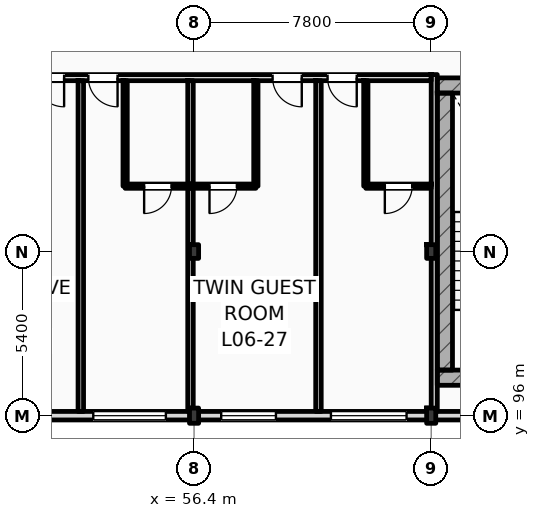
"""IFC4 building model, lengths in metres.
Left out: names, types, materials, properties, quantities, classifications, styles, units other than length and angle.
Written with IfcOpenShell. Run it as: python <this file> out.ifc"""

import sys

from ifc_helpers import new_model, si_unit, direction, frame, frame_2d, origin, origin_2d, place, context, subcontext, project, spatial, rectangle, i_section, extrude, element, fill, save


model = new_model("IFC4")
c1 = context("Model", 3, precision=1e-05, world=origin(), true_north=direction((0.0, 1.0)))
c2 = subcontext(c1, "Body", "Model", "MODEL_VIEW")
j1 = project(units=[si_unit("LENGTHUNIT", "METRE"), si_unit("PLANEANGLEUNIT", "RADIAN")], contexts=[c1])
p1 = place(None, origin())
s1 = spatial("IfcSite", under=j1, at=p1, CompositionType="ELEMENT")
p2 = place(p1, origin())
s2 = spatial("IfcBuilding", under=s1, at=p2, CompositionType="ELEMENT")
p3 = place(p2, frame((0.0, 0.0, 28.2)))
s3 = spatial("IfcBuildingStorey", under=s2, at=p3, CompositionType="ELEMENT", Elevation=28.2)
p4 = place(p3, frame((56.4, 96.0, 0.0), z_axis=(0.0, 0.0, 1.0), x_axis=(1.0, 0.0, 0.0)))
e1 = element("IfcColumn", 1, at=p4, inside=s3, PredefinedType="COLUMN", context=c2, shape_type="SweptSolid", body=[
    extrude(i_section(OverallWidth=0.3, OverallDepth=0.5, WebThickness=0.014, FlangeThickness=0.028, FilletRadius=0.027, at=origin_2d()), origin(), (0.0, 0.0, 1.0), 3.6),
])
p5 = place(p3, frame((56.4, 101.4, 0.0), z_axis=(0.0, 0.0, 1.0), x_axis=(1.0, 0.0, 0.0)))
e2 = element("IfcColumn", 2, at=p5, inside=s3, PredefinedType="COLUMN", context=c2, shape_type="SweptSolid", body=[
    extrude(i_section(OverallWidth=0.3, OverallDepth=0.45, WebThickness=0.014, FlangeThickness=0.026, FilletRadius=0.027, at=origin_2d()), origin(), (0.0, 0.0, 1.0), 3.6),
])
p6 = place(p3, frame((64.2, 96.0, 0.0), z_axis=(0.0, 0.0, 1.0), x_axis=(1.0, 0.0, 0.0)))
e3 = element("IfcColumn", 3, at=p6, inside=s3, PredefinedType="COLUMN", context=c2, shape_type="SweptSolid", body=[
    extrude(i_section(OverallWidth=0.3, OverallDepth=0.5, WebThickness=0.014, FlangeThickness=0.028, FilletRadius=0.027, at=origin_2d()), origin(), (0.0, 0.0, 1.0), 3.6),
])
p7 = place(p3, frame((64.2, 101.4, 0.0), z_axis=(0.0, 0.0, 1.0), x_axis=(1.0, 0.0, 0.0)))
e4 = element("IfcColumn", 4, at=p7, inside=s3, PredefinedType="COLUMN", context=c2, shape_type="SweptSolid", body=[
    extrude(i_section(OverallWidth=0.3, OverallDepth=0.45, WebThickness=0.014, FlangeThickness=0.026, FilletRadius=0.027, at=origin_2d()), origin(), (0.0, 0.0, 1.0), 3.6),
])
for number, where, z_axis, x_axis in (
    (5, (64.4, 106.862, 0.0), (0.0, 0.0, 1.0), (1.0, 0.0, 0.0)),
    (6, (64.4, 97.25, 0.0), (0.0, 0.0, 1.0), (1.0, 0.0, 0.0)),
):
    element("IfcWall", number, at=place(p3, frame(where, z_axis=z_axis, x_axis=x_axis)), inside=s3, PredefinedType="SHEAR", context=c2, shape_type="SweptSolid", body=[
        extrude(rectangle(XDim=5.16, YDim=0.5, at=frame_2d((2.58, 0.0))), origin(), (0.0, 0.0, 1.0), 3.6),
    ])
p8 = place(p3, frame((64.65, 97.5, 0.0), z_axis=(0.0, 0.0, 1.0), x_axis=(0.0, 1.0, 0.0)))
e7 = element("IfcWall", 7, at=p8, inside=s3, PredefinedType="SHEAR", context=c2, shape_type="SweptSolid", body=[
    extrude(rectangle(XDim=9.112, YDim=0.5, at=frame_2d((4.556, 0.0))), origin(), (0.0, 0.0, 1.0), 3.6),
])
p9 = place(p3, frame((25.2, 96.0, 0.0), z_axis=(0.0, 0.0, 1.0), x_axis=(1.0, 0.0, 0.0)))
e8 = element("IfcWall", 8, at=p9, inside=s3, PredefinedType="STANDARD", context=c2, shape_type="SweptSolid", body=[
    extrude(rectangle(XDim=94.8, YDim=0.28, at=frame_2d((47.4, 0.0))), origin(), (0.0, 0.0, 1.0), 2.8),
])
p10 = place(p9, frame((16.454, 0.0, 0.9)))
e9 = element("IfcOpeningElement", 9, at=p10, cuts=e8, PredefinedType="OPENING", context=c2, shape_type="SweptSolid", body=[
    extrude(rectangle(XDim=2.7, YDim=1.72, at=frame_2d((1.35, 0.86))), frame((0.0, 0.15, 0.0), z_axis=(0.0, -1.0, 0.0), x_axis=(1.0, 0.0, 0.0)), (0.0, 0.0, 1.0), 0.3),
])
p11 = place(p9, frame((20.068, 0.0, 0.9)))
e10 = element("IfcOpeningElement", 10, at=p11, cuts=e8, PredefinedType="OPENING", context=c2, shape_type="SweptSolid", body=[
    extrude(rectangle(XDim=2.389, YDim=1.72, at=frame_2d((1.194, 0.86))), frame((0.0, 0.15, 0.0), z_axis=(0.0, -1.0, 0.0), x_axis=(1.0, 0.0, 0.0)), (0.0, 0.0, 1.0), 0.3),
])
p12 = place(p9, frame((24.277, 0.0, 0.9)))
e11 = element("IfcOpeningElement", 11, at=p12, cuts=e8, PredefinedType="OPENING", context=c2, shape_type="SweptSolid", body=[
    extrude(rectangle(XDim=1.8, YDim=1.72, at=frame_2d((0.9, 0.86))), frame((0.0, 0.15, 0.0), z_axis=(0.0, -1.0, 0.0), x_axis=(1.0, 0.0, 0.0)), (0.0, 0.0, 1.0), 0.3),
])
p13 = place(p9, frame((27.885, 0.0, 0.9)))
e12 = element("IfcOpeningElement", 12, at=p13, cuts=e8, PredefinedType="OPENING", context=c2, shape_type="SweptSolid", body=[
    extrude(rectangle(XDim=2.388, YDim=1.72, at=frame_2d((1.194, 0.86))), frame((0.0, 0.15, 0.0), z_axis=(0.0, -1.0, 0.0), x_axis=(1.0, 0.0, 0.0)), (0.0, 0.0, 1.0), 0.3),
])
p14 = place(p9, frame((32.093, 0.0, 0.9)))
e13 = element("IfcOpeningElement", 13, at=p14, cuts=e8, PredefinedType="OPENING", context=c2, shape_type="SweptSolid", body=[
    extrude(rectangle(XDim=1.8, YDim=1.72, at=frame_2d((0.9, 0.86))), frame((0.0, 0.15, 0.0), z_axis=(0.0, -1.0, 0.0), x_axis=(1.0, 0.0, 0.0)), (0.0, 0.0, 1.0), 0.3),
])
p15 = place(p9, frame((35.702, 0.0, 0.9)))
e14 = element("IfcOpeningElement", 14, at=p15, cuts=e8, PredefinedType="OPENING", context=c2, shape_type="SweptSolid", body=[
    extrude(rectangle(XDim=2.488, YDim=1.72, at=frame_2d((1.244, 0.86))), frame((0.0, 0.15, 0.0), z_axis=(0.0, -1.0, 0.0), x_axis=(1.0, 0.0, 0.0)), (0.0, 0.0, 1.0), 0.3),
])
p16 = place(p9, frame((55.56, 0.0, 0.9)))
e15 = element("IfcOpeningElement", 15, at=p16, cuts=e8, PredefinedType="OPENING", context=c2, shape_type="SweptSolid", body=[
    extrude(rectangle(XDim=1.8, YDim=1.72, at=frame_2d((0.9, 0.86))), frame((0.0, 0.15, 0.0), z_axis=(0.0, -1.0, 0.0), x_axis=(1.0, 0.0, 0.0)), (0.0, 0.0, 1.0), 0.3),
])
p17 = place(p9, frame((58.985, 0.0, 0.9)))
e16 = element("IfcOpeningElement", 16, at=p17, cuts=e8, PredefinedType="OPENING", context=c2, shape_type="SweptSolid", body=[
    extrude(rectangle(XDim=1.8, YDim=1.72, at=frame_2d((0.9, 0.86))), frame((0.0, 0.15, 0.0), z_axis=(0.0, -1.0, 0.0), x_axis=(1.0, 0.0, 0.0)), (0.0, 0.0, 1.0), 0.3),
])
p18 = place(p9, frame((63.21, 0.0, 0.9)))
e17 = element("IfcOpeningElement", 17, at=p18, cuts=e8, PredefinedType="OPENING", context=c2, shape_type="SweptSolid", body=[
    extrude(rectangle(XDim=2.525, YDim=1.72, at=frame_2d((1.262, 0.86))), frame((0.0, 0.15, 0.0), z_axis=(0.0, -1.0, 0.0), x_axis=(1.0, 0.0, 0.0)), (0.0, 0.0, 1.0), 0.3),
])
p19 = place(p9, frame((66.955, 0.0, 0.9)))
e18 = element("IfcOpeningElement", 18, at=p19, cuts=e8, PredefinedType="OPENING", context=c2, shape_type="SweptSolid", body=[
    extrude(rectangle(XDim=1.8, YDim=1.72, at=frame_2d((0.9, 0.86))), frame((0.0, 0.15, 0.0), z_axis=(0.0, -1.0, 0.0), x_axis=(1.0, 0.0, 0.0)), (0.0, 0.0, 1.0), 0.3),
])
p20 = place(p9, frame((71.892, 0.0, 0.9)))
e19 = element("IfcOpeningElement", 19, at=p20, cuts=e8, PredefinedType="OPENING", context=c2, shape_type="SweptSolid", body=[
    extrude(rectangle(XDim=1.1, YDim=1.5, at=frame_2d((0.55, 0.75))), frame((0.0, 0.15, 0.0), z_axis=(0.0, -1.0, 0.0), x_axis=(1.0, 0.0, 0.0)), (0.0, 0.0, 1.0), 0.3),
])
p21 = place(p9, frame((75.802, 0.0, 0.9)))
e20 = element("IfcOpeningElement", 20, at=p21, cuts=e8, PredefinedType="OPENING", context=c2, shape_type="SweptSolid", body=[
    extrude(rectangle(XDim=1.25, YDim=1.6, at=frame_2d((0.625, 0.8))), frame((0.0, 0.15, 0.0), z_axis=(0.0, -1.0, 0.0), x_axis=(1.0, 0.0, 0.0)), (0.0, 0.0, 1.0), 0.3),
])
p22 = place(p9, frame((79.712, 0.0, 0.9)))
e21 = element("IfcOpeningElement", 21, at=p22, cuts=e8, PredefinedType="OPENING", context=c2, shape_type="SweptSolid", body=[
    extrude(rectangle(XDim=1.4, YDim=1.7, at=frame_2d((0.7, 0.85))), frame((0.0, 0.15, 0.0), z_axis=(0.0, -1.0, 0.0), x_axis=(1.0, 0.0, 0.0)), (0.0, 0.0, 1.0), 0.3),
])
p23 = place(p9, frame((83.597, 0.0, 0.9)))
e22 = element("IfcOpeningElement", 22, at=p23, cuts=e8, PredefinedType="OPENING", context=c2, shape_type="SweptSolid", body=[
    extrude(rectangle(XDim=1.6, YDim=1.72, at=frame_2d((0.8, 0.86))), frame((0.0, 0.15, 0.0), z_axis=(0.0, -1.0, 0.0), x_axis=(1.0, 0.0, 0.0)), (0.0, 0.0, 1.0), 0.3),
])
p24 = place(p9, frame((87.507, 0.0, 0.9)))
e23 = element("IfcOpeningElement", 23, at=p24, cuts=e8, PredefinedType="OPENING", context=c2, shape_type="SweptSolid", body=[
    extrude(rectangle(XDim=1.75, YDim=1.72, at=frame_2d((0.875, 0.86))), frame((0.0, 0.15, 0.0), z_axis=(0.0, -1.0, 0.0), x_axis=(1.0, 0.0, 0.0)), (0.0, 0.0, 1.0), 0.3),
])
p25 = place(p9, frame((91.328, 0.0, 0.9)))
e24 = element("IfcOpeningElement", 24, at=p25, cuts=e8, PredefinedType="OPENING", context=c2, shape_type="SweptSolid", body=[
    extrude(rectangle(XDim=2.0, YDim=1.72, at=frame_2d((1.0, 0.86))), frame((0.0, 0.15, 0.0), z_axis=(0.0, -1.0, 0.0), x_axis=(1.0, 0.0, 0.0)), (0.0, 0.0, 1.0), 0.3),
])
p26 = place(p3, frame((40.76, 107.12, 0.0), z_axis=(0.0, 0.0, 1.0), x_axis=(1.0, 0.0, 0.0)))
e25 = element("IfcWall", 25, at=p26, inside=s3, PredefinedType="PARTITIONING", context=c2, shape_type="SweptSolid", body=[
    extrude(rectangle(XDim=23.44, YDim=0.2, at=frame_2d((11.72, 0.0))), origin(), (0.0, 0.0, 1.0), 3.36),
])
p27 = place(p26, frame((2.639, 0.0, 0.0)))
e26 = element("IfcOpeningElement", 26, at=p27, cuts=e25, PredefinedType="OPENING", context=c2, shape_type="SweptSolid", body=[
    extrude(rectangle(XDim=0.96, YDim=2.2, at=frame_2d((0.48, 1.1))), frame((0.0, 0.11, 0.0), z_axis=(0.0, -1.0, 0.0), x_axis=(1.0, 0.0, 0.0)), (0.0, 0.0, 1.0), 0.22),
])
p28 = place(p26, frame((4.348, 0.0, 0.0)))
e27 = element("IfcOpeningElement", 27, at=p28, cuts=e25, PredefinedType="OPENING", context=c2, shape_type="SweptSolid", body=[
    extrude(rectangle(XDim=0.96, YDim=2.2, at=frame_2d((0.48, 1.1))), frame((0.0, 0.11, 0.0), z_axis=(0.0, -1.0, 0.0), x_axis=(1.0, 0.0, 0.0)), (0.0, 0.0, 1.0), 0.22),
])
p29 = place(p26, frame((10.406, 0.0, 0.0)))
e28 = element("IfcOpeningElement", 28, at=p29, cuts=e25, PredefinedType="OPENING", context=c2, shape_type="SweptSolid", body=[
    extrude(rectangle(XDim=0.96, YDim=2.2, at=frame_2d((0.48, 1.1))), frame((0.0, 0.11, 0.0), z_axis=(0.0, -1.0, 0.0), x_axis=(1.0, 0.0, 0.0)), (0.0, 0.0, 1.0), 0.22),
])
p30 = place(p26, frame((12.164, 0.0, 0.0)))
e29 = element("IfcOpeningElement", 29, at=p30, cuts=e25, PredefinedType="OPENING", context=c2, shape_type="SweptSolid", body=[
    extrude(rectangle(XDim=0.96, YDim=2.2, at=frame_2d((0.48, 1.1))), frame((0.0, 0.11, 0.0), z_axis=(0.0, -1.0, 0.0), x_axis=(1.0, 0.0, 0.0)), (0.0, 0.0, 1.0), 0.22),
])
p31 = place(p26, frame((18.223, 0.0, 0.0)))
e30 = element("IfcOpeningElement", 30, at=p31, cuts=e25, PredefinedType="OPENING", context=c2, shape_type="SweptSolid", body=[
    extrude(rectangle(XDim=0.96, YDim=2.2, at=frame_2d((0.48, 1.1))), frame((0.0, 0.11, 0.0), z_axis=(0.0, -1.0, 0.0), x_axis=(1.0, 0.0, 0.0)), (0.0, 0.0, 1.0), 0.22),
])
p32 = place(p26, frame((20.031, 0.0, 0.0)))
e31 = element("IfcOpeningElement", 31, at=p32, cuts=e25, PredefinedType="OPENING", context=c2, shape_type="SweptSolid", body=[
    extrude(rectangle(XDim=0.96, YDim=2.2, at=frame_2d((0.48, 1.1))), frame((0.0, 0.11, 0.0), z_axis=(0.0, -1.0, 0.0), x_axis=(1.0, 0.0, 0.0)), (0.0, 0.0, 1.0), 0.22),
])
p33 = place(p3, frame((64.3, 96.14, 0.0), z_axis=(0.0, 0.0, 1.0), x_axis=(0.0, 1.0, 0.0)))
e32 = element("IfcWall", 32, at=p33, inside=s3, PredefinedType="PARTITIONING", context=c2, shape_type="SweptSolid", body=[
    extrude(rectangle(XDim=11.08, YDim=0.2, at=frame_2d((5.54, 0.0))), origin(), (0.0, 0.0, 1.0), 2.99),
])
p34 = place(p3, frame((52.675, 96.14, 0.0), z_axis=(0.0, 0.0, 1.0), x_axis=(0.0, 1.0, 0.0)))
e33 = element("IfcWall", 33, at=p34, inside=s3, PredefinedType="PARTITIONING", context=c2, shape_type="SweptSolid", body=[
    extrude(rectangle(XDim=10.88, YDim=0.18, at=frame_2d((5.44, 0.0))), origin(), (0.0, 0.0, 1.0), 3.36),
])
p35 = place(p3, frame((56.283, 96.14, 0.0), z_axis=(0.0, 0.0, 1.0), x_axis=(0.0, 1.0, 0.0)))
e34 = element("IfcWall", 34, at=p35, inside=s3, PredefinedType="PARTITIONING", context=c2, shape_type="SweptSolid", body=[
    extrude(rectangle(XDim=10.88, YDim=0.18, at=frame_2d((5.44, 0.0))), origin(), (0.0, 0.0, 1.0), 2.99),
])
p36 = place(p3, frame((54.133, 103.55, 0.0), z_axis=(0.0, 0.0, 1.0), x_axis=(0.0, 1.0, 0.0)))
e35 = element("IfcWall", 35, at=p36, inside=s3, PredefinedType="PARTITIONING", context=c2, shape_type="SweptSolid", body=[
    extrude(rectangle(XDim=3.47, YDim=0.14, at=frame_2d((1.735, 0.0))), origin(), (0.0, 0.0, 1.0), 3.36),
])
p37 = place(p3, frame((54.133, 103.55, 0.0), z_axis=(0.0, 0.0, 1.0), x_axis=(1.0, 0.0, 0.0)))
e36 = element("IfcWall", 36, at=p37, inside=s3, PredefinedType="PARTITIONING", context=c2, shape_type="SweptSolid", body=[
    extrude(rectangle(XDim=2.15, YDim=0.14, at=frame_2d((1.075, 0.0))), origin(), (0.0, 0.0, 1.0), 3.36),
])
p38 = place(p37, frame((0.625, 0.0, 0.0)))
e37 = element("IfcOpeningElement", 37, at=p38, cuts=e36, PredefinedType="OPENING", context=c2, shape_type="SweptSolid", body=[
    extrude(rectangle(XDim=0.9, YDim=2.1, at=frame_2d((0.45, 1.05))), frame((0.0, 0.08, 0.0), z_axis=(0.0, -1.0, 0.0), x_axis=(1.0, 0.0, 0.0)), (0.0, 0.0, 1.0), 0.16),
])
p39 = place(p3, frame((60.492, 96.14, 0.0), z_axis=(0.0, 0.0, 1.0), x_axis=(0.0, 1.0, 0.0)))
e38 = element("IfcWall", 38, at=p39, inside=s3, PredefinedType="PARTITIONING", context=c2, shape_type="SweptSolid", body=[
    extrude(rectangle(XDim=10.88, YDim=0.18, at=frame_2d((5.44, 0.0))), origin(), (0.0, 0.0, 1.0), 3.36),
])
p40 = place(p3, frame((58.433, 103.55, 0.0), z_axis=(0.0, 0.0, 1.0), x_axis=(0.0, 1.0, 0.0)))
e39 = element("IfcWall", 39, at=p40, inside=s3, PredefinedType="PARTITIONING", context=c2, shape_type="SweptSolid", body=[
    extrude(rectangle(XDim=3.47, YDim=0.14, at=frame_2d((1.735, 0.0))), origin(), (0.0, 0.0, 1.0), 3.36),
])
p41 = place(p3, frame((56.283, 103.55, 0.0), z_axis=(0.0, 0.0, 1.0), x_axis=(1.0, 0.0, 0.0)))
e40 = element("IfcWall", 40, at=p41, inside=s3, PredefinedType="PARTITIONING", context=c2, shape_type="SweptSolid", body=[
    extrude(rectangle(XDim=2.15, YDim=0.14, at=frame_2d((1.075, 0.0))), origin(), (0.0, 0.0, 1.0), 3.36),
])
p42 = place(p41, frame((0.625, 0.0, 0.0)))
e41 = element("IfcOpeningElement", 41, at=p42, cuts=e40, PredefinedType="OPENING", context=c2, shape_type="SweptSolid", body=[
    extrude(rectangle(XDim=0.9, YDim=2.1, at=frame_2d((0.45, 1.05))), frame((0.0, 0.08, 0.0), z_axis=(0.0, -1.0, 0.0), x_axis=(1.0, 0.0, 0.0)), (0.0, 0.0, 1.0), 0.16),
])
p43 = place(p3, frame((62.05, 103.55, 0.0), z_axis=(0.0, 0.0, 1.0), x_axis=(0.0, 1.0, 0.0)))
e42 = element("IfcWall", 42, at=p43, inside=s3, PredefinedType="PARTITIONING", context=c2, shape_type="SweptSolid", body=[
    extrude(rectangle(XDim=3.47, YDim=0.14, at=frame_2d((1.735, 0.0))), origin(), (0.0, 0.0, 1.0), 3.36),
])
p44 = place(p3, frame((62.05, 103.55, 0.0), z_axis=(0.0, 0.0, 1.0), x_axis=(1.0, 0.0, 0.0)))
e43 = element("IfcWall", 43, at=p44, inside=s3, PredefinedType="PARTITIONING", context=c2, shape_type="SweptSolid", body=[
    extrude(rectangle(XDim=2.15, YDim=0.14, at=frame_2d((1.075, 0.0))), origin(), (0.0, 0.0, 1.0), 3.36),
])
p45 = place(p44, frame((0.625, 0.0, 0.0)))
e44 = element("IfcOpeningElement", 44, at=p45, cuts=e43, PredefinedType="OPENING", context=c2, shape_type="SweptSolid", body=[
    extrude(rectangle(XDim=0.9, YDim=2.1, at=frame_2d((0.45, 1.05))), frame((0.0, 0.08, 0.0), z_axis=(0.0, -1.0, 0.0), x_axis=(1.0, 0.0, 0.0)), (0.0, 0.0, 1.0), 0.16),
])
p46 = place(p13, origin())
e45 = element("IfcWindow", 45, at=p46, inside=s3, PartitioningType="DOUBLE_PANEL_VERTICAL", PredefinedType="WINDOW", context=c2, shape_type="SweptSolid", body=[
    extrude(rectangle(XDim=2.388, YDim=1.72, at=frame_2d((1.194, 0.86))), frame((0.0, 0.03, 0.0), z_axis=(0.0, -1.0, 0.0), x_axis=(1.0, 0.0, 0.0)), (0.0, 0.0, 1.0), 0.06),
])
fill(e12, e45)
p47 = place(p14, origin())
e46 = element("IfcWindow", 46, at=p47, inside=s3, PartitioningType="DOUBLE_PANEL_VERTICAL", PredefinedType="WINDOW", context=c2, shape_type="SweptSolid", body=[
    extrude(rectangle(XDim=1.8, YDim=1.72, at=frame_2d((0.9, 0.86))), frame((0.0, 0.03, 0.0), z_axis=(0.0, -1.0, 0.0), x_axis=(1.0, 0.0, 0.0)), (0.0, 0.0, 1.0), 0.06),
])
fill(e13, e46)
p48 = place(p15, origin())
e47 = element("IfcWindow", 47, at=p48, inside=s3, PartitioningType="DOUBLE_PANEL_VERTICAL", PredefinedType="WINDOW", context=c2, shape_type="SweptSolid", body=[
    extrude(rectangle(XDim=2.488, YDim=1.72, at=frame_2d((1.244, 0.86))), frame((0.0, 0.03, 0.0), z_axis=(0.0, -1.0, 0.0), x_axis=(1.0, 0.0, 0.0)), (0.0, 0.0, 1.0), 0.06),
])
fill(e14, e47)
p49 = place(p29, frame((0.96, 0.0, 0.0), z_axis=(0.0, 0.0, 1.0), x_axis=(-1.0, 0.0, 0.0)))
e48 = element("IfcDoor", 48, at=p49, inside=s3, OperationType="SINGLE_SWING_RIGHT", PredefinedType="DOOR", context=c2, shape_type="SweptSolid", body=[
    extrude(rectangle(XDim=0.96, YDim=2.2, at=frame_2d((0.48, 1.1))), frame((0.0, 0.025, 0.0), z_axis=(0.0, -1.0, 0.0), x_axis=(1.0, 0.0, 0.0)), (0.0, 0.0, 1.0), 0.05),
])
fill(e28, e48)
p50 = place(p30, frame((0.96, 0.0, 0.0), z_axis=(0.0, 0.0, 1.0), x_axis=(-1.0, 0.0, 0.0)))
e49 = element("IfcDoor", 49, at=p50, inside=s3, OperationType="SINGLE_SWING_RIGHT", PredefinedType="DOOR", context=c2, shape_type="SweptSolid", body=[
    extrude(rectangle(XDim=0.96, YDim=2.2, at=frame_2d((0.48, 1.1))), frame((0.0, 0.025, 0.0), z_axis=(0.0, -1.0, 0.0), x_axis=(1.0, 0.0, 0.0)), (0.0, 0.0, 1.0), 0.05),
])
fill(e29, e49)
p51 = place(p38, frame((0.9, 0.0, 0.0), z_axis=(0.0, 0.0, 1.0), x_axis=(-1.0, 0.0, 0.0)))
e50 = element("IfcDoor", 50, at=p51, inside=s3, OperationType="SINGLE_SWING_LEFT", PredefinedType="DOOR", context=c2, shape_type="SweptSolid", body=[
    extrude(rectangle(XDim=0.9, YDim=2.1, at=frame_2d((0.45, 1.05))), frame((0.0, 0.025, 0.0), z_axis=(0.0, -1.0, 0.0), x_axis=(1.0, 0.0, 0.0)), (0.0, 0.0, 1.0), 0.05),
])
fill(e37, e50)
p52 = place(p31, frame((0.96, 0.0, 0.0), z_axis=(0.0, 0.0, 1.0), x_axis=(-1.0, 0.0, 0.0)))
e51 = element("IfcDoor", 51, at=p52, inside=s3, OperationType="SINGLE_SWING_RIGHT", PredefinedType="DOOR", context=c2, shape_type="SweptSolid", body=[
    extrude(rectangle(XDim=0.96, YDim=2.2, at=frame_2d((0.48, 1.1))), frame((0.0, 0.025, 0.0), z_axis=(0.0, -1.0, 0.0), x_axis=(1.0, 0.0, 0.0)), (0.0, 0.0, 1.0), 0.05),
])
fill(e30, e51)
p53 = place(p42, frame((0.9, 0.0, 0.0), z_axis=(0.0, 0.0, 1.0), x_axis=(-1.0, 0.0, 0.0)))
e52 = element("IfcDoor", 52, at=p53, inside=s3, OperationType="SINGLE_SWING_LEFT", PredefinedType="DOOR", context=c2, shape_type="SweptSolid", body=[
    extrude(rectangle(XDim=0.9, YDim=2.1, at=frame_2d((0.45, 1.05))), frame((0.0, 0.025, 0.0), z_axis=(0.0, -1.0, 0.0), x_axis=(1.0, 0.0, 0.0)), (0.0, 0.0, 1.0), 0.05),
])
fill(e41, e52)
p54 = place(p32, frame((0.96, 0.0, 0.0), z_axis=(0.0, 0.0, 1.0), x_axis=(-1.0, 0.0, 0.0)))
e53 = element("IfcDoor", 53, at=p54, inside=s3, OperationType="SINGLE_SWING_RIGHT", PredefinedType="DOOR", context=c2, shape_type="SweptSolid", body=[
    extrude(rectangle(XDim=0.96, YDim=2.2, at=frame_2d((0.48, 1.1))), frame((0.0, 0.025, 0.0), z_axis=(0.0, -1.0, 0.0), x_axis=(1.0, 0.0, 0.0)), (0.0, 0.0, 1.0), 0.05),
])
fill(e31, e53)
p55 = place(p45, frame((0.9, 0.0, 0.0), z_axis=(0.0, 0.0, 1.0), x_axis=(-1.0, 0.0, 0.0)))
e54 = element("IfcDoor", 54, at=p55, inside=s3, OperationType="SINGLE_SWING_LEFT", PredefinedType="DOOR", context=c2, shape_type="SweptSolid", body=[
    extrude(rectangle(XDim=0.9, YDim=2.1, at=frame_2d((0.45, 1.05))), frame((0.0, 0.025, 0.0), z_axis=(0.0, -1.0, 0.0), x_axis=(1.0, 0.0, 0.0)), (0.0, 0.0, 1.0), 0.05),
])
fill(e44, e54)
save(model, sys.argv[1])
